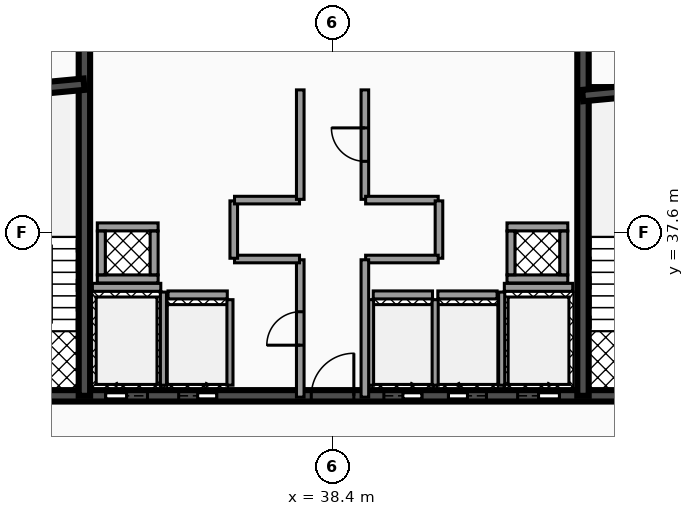
"""IFC4 building model, lengths in metres.
Left out: names, types, materials, properties, quantities, classifications, styles, units other than length and angle.
Written with IfcOpenShell. Run it as: python <this file> out.ifc"""

import sys

from ifc_helpers import new_model, si_unit, direction, frame, frame_2d, origin, place, context, subcontext, project, spatial, rectangle, extrude, element, fill, save


model = new_model("IFC4")
c1 = context("Model", 3, precision=1e-05, world=origin(), true_north=direction((0.0, 1.0)))
c2 = subcontext(c1, "Body", "Model", "MODEL_VIEW")
j1 = project(units=[si_unit("LENGTHUNIT", "METRE"), si_unit("PLANEANGLEUNIT", "RADIAN")], contexts=[c1])
p1 = place(None, origin())
s1 = spatial("IfcSite", under=j1, at=p1, CompositionType="ELEMENT")
p2 = place(p1, origin())
s2 = spatial("IfcBuilding", under=s1, at=p2, CompositionType="ELEMENT")
p3 = place(p2, frame((0.0, 0.0, 275.4)))
s3 = spatial("IfcBuildingStorey", under=s2, at=p3, CompositionType="ELEMENT", Elevation=275.4)
p4 = place(p3, frame((28.5, 33.3, 0.0), z_axis=(0.0, 0.0, 1.0), x_axis=(1.0, 0.0, 0.0)))
e1 = element("IfcWall", 1, at=p4, inside=s3, PredefinedType="SHEAR", context=c2, shape_type="SweptSolid", body=[
    extrude(rectangle(XDim=19.86, YDim=0.3, at=frame_2d((9.93, 0.0))), origin(), (0.0, 0.0, 1.0), 3.18),
])
p5 = place(p4, frame((3.93, 0.0, 0.0)))
e2 = element("IfcOpeningElement", 2, at=p5, cuts=e1, PredefinedType="OPENING", context=c2, shape_type="SweptSolid", body=[
    extrude(rectangle(XDim=1.1, YDim=2.15, at=frame_2d((0.55, 1.075))), frame((0.0, 0.16, 0.0), z_axis=(0.0, -1.0, 0.0), x_axis=(1.0, 0.0, 0.0)), (0.0, 0.0, 1.0), 0.32),
])
p6 = place(p4, frame((14.77, 0.0, 0.0)))
e3 = element("IfcOpeningElement", 3, at=p6, cuts=e1, PredefinedType="OPENING", context=c2, shape_type="SweptSolid", body=[
    extrude(rectangle(XDim=1.1, YDim=2.15, at=frame_2d((0.55, 1.075))), frame((0.0, 0.16, 0.0), z_axis=(0.0, -1.0, 0.0), x_axis=(1.0, 0.0, 0.0)), (0.0, 0.0, 1.0), 0.32),
])
p7 = place(p4, frame((11.25, 0.0, 0.0)))
e4 = element("IfcOpeningElement", 4, at=p7, cuts=e1, PredefinedType="OPENING", context=c2, shape_type="SweptSolid", body=[
    extrude(rectangle(XDim=1.0, YDim=2.1, at=frame_2d((0.5, 1.05))), frame((0.0, 0.16, 0.0), z_axis=(0.0, -1.0, 0.0), x_axis=(1.0, 0.0, 0.0)), (0.0, 0.0, 1.0), 0.32),
])
p8 = place(p4, frame((12.95, 0.0, 0.0)))
e5 = element("IfcOpeningElement", 5, at=p8, cuts=e1, PredefinedType="OPENING", context=c2, shape_type="SweptSolid", body=[
    extrude(rectangle(XDim=1.0, YDim=2.1, at=frame_2d((0.5, 1.05))), frame((0.0, 0.16, 0.0), z_axis=(0.0, -1.0, 0.0), x_axis=(1.0, 0.0, 0.0)), (0.0, 0.0, 1.0), 0.32),
])
p9 = place(p4, frame((5.85, 0.0, 0.0)))
e6 = element("IfcOpeningElement", 6, at=p9, cuts=e1, PredefinedType="OPENING", context=c2, shape_type="SweptSolid", body=[
    extrude(rectangle(XDim=1.0, YDim=2.1, at=frame_2d((0.5, 1.05))), frame((0.0, 0.16, 0.0), z_axis=(0.0, -1.0, 0.0), x_axis=(1.0, 0.0, 0.0)), (0.0, 0.0, 1.0), 0.32),
])
p10 = place(p4, frame((1.21, 0.0, 0.0)))
e7 = element("IfcOpeningElement", 7, at=p10, cuts=e1, PredefinedType="OPENING", context=c2, shape_type="SweptSolid", body=[
    extrude(rectangle(XDim=1.1, YDim=2.2, at=frame_2d((0.55, 1.1))), frame((0.0, 0.16, 0.0), z_axis=(0.0, -1.0, 0.0), x_axis=(1.0, 0.0, 0.0)), (0.0, 0.0, 1.0), 0.32),
])
p11 = place(p4, frame((9.34, 0.0, 0.0)))
e8 = element("IfcOpeningElement", 8, at=p11, cuts=e1, PredefinedType="OPENING", context=c2, shape_type="SweptSolid", body=[
    extrude(rectangle(XDim=1.12, YDim=2.05, at=frame_2d((0.56, 1.025))), frame((0.0, 0.16, 0.0), z_axis=(0.0, -1.0, 0.0), x_axis=(1.0, 0.0, 0.0)), (0.0, 0.0, 1.0), 0.32),
])
p12 = place(p4, frame((17.55, 0.0, 0.0)))
e9 = element("IfcOpeningElement", 9, at=p12, cuts=e1, PredefinedType="OPENING", context=c2, shape_type="SweptSolid", body=[
    extrude(rectangle(XDim=1.1, YDim=2.2, at=frame_2d((0.55, 1.1))), frame((0.0, 0.16, 0.0), z_axis=(0.0, -1.0, 0.0), x_axis=(1.0, 0.0, 0.0)), (0.0, 0.0, 1.0), 0.32),
])
for number, where, z_axis, x_axis in (
    (10, (31.87, 33.3, 0.0), (0.0, 0.0, 1.0), (0.0, 1.0, 0.0)),
    (11, (44.99, 33.3, 0.0), (0.0, 0.0, 1.0), (0.0, 1.0, 0.0)),
):
    element("IfcWall", number, at=place(p3, frame(where, z_axis=z_axis, x_axis=x_axis)), inside=s3, PredefinedType="SHEAR", context=c2, shape_type="SweptSolid", body=[
        extrude(rectangle(XDim=10.1, YDim=0.3, at=frame_2d((5.05, 0.0))), origin(), (0.0, 0.0, 1.0), 3.18),
    ])
p13 = place(p3, frame((28.64, 41.2, 0.0), z_axis=(0.0, 0.0, 1.0), x_axis=(0.995687118776, 0.092774789157, 0.0)))
e12 = element("IfcWall", 12, at=p13, inside=s3, PredefinedType="SHEAR", context=c2, shape_type="SweptSolid", body=[
    extrude(rectangle(XDim=3.234, YDim=0.3, at=frame_2d((1.617, 0.0))), origin(), (0.0, 0.0, 1.0), 3.18),
])
p14 = place(p3, frame((44.98, 41.2, 0.0), z_axis=(0.0, 0.0, 1.0), x_axis=(0.995686468965, 0.09278176286, 0.0)))
e13 = element("IfcWall", 13, at=p14, inside=s3, PredefinedType="SHEAR", context=c2, shape_type="SweptSolid", body=[
    extrude(rectangle(XDim=3.234, YDim=0.3, at=frame_2d((1.617, 0.0))), origin(), (0.0, 0.0, 1.0), 3.18),
])
p15 = place(p3, frame((32.08, 36.155, 0.0), z_axis=(0.0, 0.0, 1.0), x_axis=(1.0, 0.0, 0.0)))
e14 = element("IfcWall", 14, at=p15, inside=s3, PredefinedType="SOLIDWALL", context=c2, shape_type="SweptSolid", body=[
    extrude(rectangle(XDim=1.8, YDim=0.21, at=frame_2d((0.9, 0.0))), origin(), (0.0, 0.0, 1.0), 3.18),
])
p16 = place(p3, frame((33.95, 33.58, 0.0), z_axis=(0.0, 0.0, 1.0), x_axis=(0.0, 1.0, 0.0)))
e15 = element("IfcWall", 15, at=p16, inside=s3, PredefinedType="SOLIDWALL", context=c2, shape_type="SweptSolid", body=[
    extrude(rectangle(XDim=2.45, YDim=0.16, at=frame_2d((1.225, 0.0))), origin(), (0.0, 0.0, 1.0), 3.18),
])
p17 = place(p3, frame((42.92, 36.155, 0.0), z_axis=(0.0, 0.0, 1.0), x_axis=(1.0, 0.0, 0.0)))
e16 = element("IfcWall", 16, at=p17, inside=s3, PredefinedType="SOLIDWALL", context=c2, shape_type="SweptSolid", body=[
    extrude(rectangle(XDim=1.8, YDim=0.21, at=frame_2d((0.9, 0.0))), origin(), (0.0, 0.0, 1.0), 3.18),
])
p18 = place(p3, frame((42.85, 33.58, 0.0), z_axis=(0.0, 0.0, 1.0), x_axis=(0.0, 1.0, 0.0)))
e17 = element("IfcWall", 17, at=p18, inside=s3, PredefinedType="SOLIDWALL", context=c2, shape_type="SweptSolid", body=[
    extrude(rectangle(XDim=2.45, YDim=0.16, at=frame_2d((1.225, 0.0))), origin(), (0.0, 0.0, 1.0), 3.18),
])
p19 = place(p3, frame((39.47, 35.955, 0.0), z_axis=(0.0, 0.0, 1.0), x_axis=(1.0, 0.0, 0.0)))
e18 = element("IfcWall", 18, at=p19, inside=s3, PredefinedType="SOLIDWALL", context=c2, shape_type="SweptSolid", body=[
    extrude(rectangle(XDim=1.56, YDim=0.21, at=frame_2d((0.78, 0.0))), origin(), (0.0, 0.0, 1.0), 3.18),
])
for number, where, z_axis, x_axis in (
    (19, (39.4, 33.58, 0.0), (0.0, 0.0, 1.0), (0.0, 1.0, 0.0)),
    (20, (41.1, 33.58, 0.0), (0.0, 0.0, 1.0), (0.0, 1.0, 0.0)),
):
    element("IfcWall", number, at=place(p3, frame(where, z_axis=z_axis, x_axis=x_axis)), inside=s3, PredefinedType="SOLIDWALL", context=c2, shape_type="SweptSolid", body=[
        extrude(rectangle(XDim=2.25, YDim=0.16, at=frame_2d((1.125, 0.0))), origin(), (0.0, 0.0, 1.0), 3.18),
    ])
p20 = place(p3, frame((41.17, 35.955, 0.0), z_axis=(0.0, 0.0, 1.0), x_axis=(1.0, 0.0, 0.0)))
e21 = element("IfcWall", 21, at=p20, inside=s3, PredefinedType="SOLIDWALL", context=c2, shape_type="SweptSolid", body=[
    extrude(rectangle(XDim=1.56, YDim=0.21, at=frame_2d((0.78, 0.0))), origin(), (0.0, 0.0, 1.0), 3.18),
])
p21 = place(p3, frame((34.07, 35.955, 0.0), z_axis=(0.0, 0.0, 1.0), x_axis=(1.0, 0.0, 0.0)))
e22 = element("IfcWall", 22, at=p21, inside=s3, PredefinedType="SOLIDWALL", context=c2, shape_type="SweptSolid", body=[
    extrude(rectangle(XDim=1.56, YDim=0.21, at=frame_2d((0.78, 0.0))), origin(), (0.0, 0.0, 1.0), 3.18),
])
p22 = place(p3, frame((35.7, 33.58, 0.0), z_axis=(0.0, 0.0, 1.0), x_axis=(0.0, 1.0, 0.0)))
e23 = element("IfcWall", 23, at=p22, inside=s3, PredefinedType="SOLIDWALL", context=c2, shape_type="SweptSolid", body=[
    extrude(rectangle(XDim=2.25, YDim=0.16, at=frame_2d((1.125, 0.0))), origin(), (0.0, 0.0, 1.0), 3.18),
])
for number, where, z_axis, x_axis in (
    (24, (32.21, 36.375, 0.0), (0.0, 0.0, 1.0), (1.0, 0.0, 0.0)),
    (25, (32.21, 37.745, 0.0), (0.0, 0.0, 1.0), (1.0, 0.0, 0.0)),
):
    element("IfcWall", number, at=place(p3, frame(where, z_axis=z_axis, x_axis=x_axis)), inside=s3, PredefinedType="SOLIDWALL", context=c2, shape_type="SweptSolid", body=[
        extrude(rectangle(XDim=1.6, YDim=0.21, at=frame_2d((0.8, 0.0))), origin(), (0.0, 0.0, 1.0), 3.18),
    ])
for number, where, z_axis, x_axis in (
    (26, (32.315, 36.485, 0.0), (0.0, 0.0, 1.0), (0.0, 1.0, 0.0)),
    (27, (33.705, 36.485, 0.0), (0.0, 0.0, 1.0), (0.0, 1.0, 0.0)),
):
    element("IfcWall", number, at=place(p3, frame(where, z_axis=z_axis, x_axis=x_axis)), inside=s3, PredefinedType="SOLIDWALL", context=c2, shape_type="SweptSolid", body=[
        extrude(rectangle(XDim=1.15, YDim=0.21, at=frame_2d((0.575, 0.0))), origin(), (0.0, 0.0, 1.0), 3.18),
    ])
for number, where, z_axis, x_axis in (
    (28, (42.99, 36.375, 0.0), (0.0, 0.0, 1.0), (1.0, 0.0, 0.0)),
    (29, (42.99, 37.745, 0.0), (0.0, 0.0, 1.0), (1.0, 0.0, 0.0)),
):
    element("IfcWall", number, at=place(p3, frame(where, z_axis=z_axis, x_axis=x_axis)), inside=s3, PredefinedType="SOLIDWALL", context=c2, shape_type="SweptSolid", body=[
        extrude(rectangle(XDim=1.6, YDim=0.21, at=frame_2d((0.8, 0.0))), origin(), (0.0, 0.0, 1.0), 3.18),
    ])
for number, where, z_axis, x_axis in (
    (30, (43.095, 36.485, 0.0), (0.0, 0.0, 1.0), (0.0, 1.0, 0.0)),
    (31, (44.485, 36.485, 0.0), (0.0, 0.0, 1.0), (0.0, 1.0, 0.0)),
):
    element("IfcWall", number, at=place(p3, frame(where, z_axis=z_axis, x_axis=x_axis)), inside=s3, PredefinedType="SOLIDWALL", context=c2, shape_type="SweptSolid", body=[
        extrude(rectangle(XDim=1.15, YDim=0.21, at=frame_2d((0.575, 0.0))), origin(), (0.0, 0.0, 1.0), 3.18),
    ])
p23 = place(p3, frame((37.55, 33.265, 0.0), z_axis=(0.0, 0.0, 1.0), x_axis=(0.0, 1.0, 0.0)))
e32 = element("IfcWall", 32, at=p23, inside=s3, PredefinedType="PARTITIONING", context=c2, shape_type="SweptSolid", body=[
    extrude(rectangle(XDim=3.615, YDim=0.2, at=frame_2d((1.808, 0.0))), origin(), (0.0, 0.0, 1.0), 2.235),
])
p24 = place(p23, frame((1.367, 0.0, 0.0)))
e33 = element("IfcOpeningElement", 33, at=p24, cuts=e32, PredefinedType="OPENING", context=c2, shape_type="SweptSolid", body=[
    extrude(rectangle(XDim=0.88, YDim=2.05, at=frame_2d((0.44, 1.025))), frame((0.0, 0.11, 0.0), z_axis=(0.0, -1.0, 0.0), x_axis=(1.0, 0.0, 0.0)), (0.0, 0.0, 1.0), 0.22),
])
p25 = place(p3, frame((35.82, 36.9, 0.0), z_axis=(0.0, 0.0, 1.0), x_axis=(1.0, 0.0, 0.0)))
e34 = element("IfcWall", 34, at=p25, inside=s3, PredefinedType="PARTITIONING", context=c2, shape_type="SweptSolid", body=[
    extrude(rectangle(XDim=1.71, YDim=0.2, at=frame_2d((0.855, 0.0))), origin(), (0.0, 0.0, 1.0), 2.235),
])
p26 = place(p3, frame((35.8, 36.92, 0.0), z_axis=(0.0, 0.0, 1.0), x_axis=(0.0, 1.0, 0.0)))
e35 = element("IfcWall", 35, at=p26, inside=s3, PredefinedType="PARTITIONING", context=c2, shape_type="SweptSolid", body=[
    extrude(rectangle(XDim=1.51, YDim=0.2, at=frame_2d((0.755, 0.0))), origin(), (0.0, 0.0, 1.0), 2.235),
])
p27 = place(p3, frame((35.82, 38.45, 0.0), z_axis=(0.0, 0.0, 1.0), x_axis=(1.0, 0.0, 0.0)))
e36 = element("IfcWall", 36, at=p27, inside=s3, PredefinedType="PARTITIONING", context=c2, shape_type="SweptSolid", body=[
    extrude(rectangle(XDim=1.71, YDim=0.2, at=frame_2d((0.855, 0.0))), origin(), (0.0, 0.0, 1.0), 2.235),
])
p28 = place(p3, frame((37.55, 38.47, 0.0), z_axis=(0.0, 0.0, 1.0), x_axis=(0.0, 1.0, 0.0)))
e37 = element("IfcWall", 37, at=p28, inside=s3, PredefinedType="PARTITIONING", context=c2, shape_type="SweptSolid", body=[
    extrude(rectangle(XDim=2.88, YDim=0.2, at=frame_2d((1.44, 0.0))), origin(), (0.0, 0.0, 1.0), 2.235),
])
p29 = place(p3, frame((39.25, 38.47, 0.0), z_axis=(0.0, 0.0, 1.0), x_axis=(0.0, 1.0, 0.0)))
e38 = element("IfcWall", 38, at=p29, inside=s3, PredefinedType="PARTITIONING", context=c2, shape_type="SweptSolid", body=[
    extrude(rectangle(XDim=2.88, YDim=0.2, at=frame_2d((1.44, 0.0))), origin(), (0.0, 0.0, 1.0), 2.235),
])
p30 = place(p29, frame((1.0, 0.0, 0.0)))
e39 = element("IfcOpeningElement", 39, at=p30, cuts=e38, PredefinedType="OPENING", context=c2, shape_type="SweptSolid", body=[
    extrude(rectangle(XDim=0.88, YDim=2.05, at=frame_2d((0.44, 1.025))), frame((0.0, 0.11, 0.0), z_axis=(0.0, -1.0, 0.0), x_axis=(1.0, 0.0, 0.0)), (0.0, 0.0, 1.0), 0.22),
])
p31 = place(p3, frame((39.27, 38.45, 0.0), z_axis=(0.0, 0.0, 1.0), x_axis=(1.0, 0.0, 0.0)))
e40 = element("IfcWall", 40, at=p31, inside=s3, PredefinedType="PARTITIONING", context=c2, shape_type="SweptSolid", body=[
    extrude(rectangle(XDim=1.91, YDim=0.2, at=frame_2d((0.955, 0.0))), origin(), (0.0, 0.0, 1.0), 2.235),
])
p32 = place(p3, frame((41.2, 36.92, 0.0), z_axis=(0.0, 0.0, 1.0), x_axis=(0.0, 1.0, 0.0)))
e41 = element("IfcWall", 41, at=p32, inside=s3, PredefinedType="PARTITIONING", context=c2, shape_type="SweptSolid", body=[
    extrude(rectangle(XDim=1.51, YDim=0.2, at=frame_2d((0.755, 0.0))), origin(), (0.0, 0.0, 1.0), 2.235),
])
p33 = place(p3, frame((39.27, 36.9, 0.0), z_axis=(0.0, 0.0, 1.0), x_axis=(1.0, 0.0, 0.0)))
e42 = element("IfcWall", 42, at=p33, inside=s3, PredefinedType="PARTITIONING", context=c2, shape_type="SweptSolid", body=[
    extrude(rectangle(XDim=1.91, YDim=0.2, at=frame_2d((0.955, 0.0))), origin(), (0.0, 0.0, 1.0), 2.235),
])
p34 = place(p3, frame((39.25, 33.265, 0.0), z_axis=(0.0, 0.0, 1.0), x_axis=(0.0, 1.0, 0.0)))
e43 = element("IfcWall", 43, at=p34, inside=s3, PredefinedType="PARTITIONING", context=c2, shape_type="SweptSolid", body=[
    extrude(rectangle(XDim=3.615, YDim=0.2, at=frame_2d((1.808, 0.0))), origin(), (0.0, 0.0, 1.0), 2.235),
])
p35 = place(p5, origin())
e44 = element("IfcDoor", 44, at=p35, inside=s3, OperationType="SLIDING_TO_LEFT", PredefinedType="DOOR", context=c2, shape_type="SweptSolid", body=[
    extrude(rectangle(XDim=1.1, YDim=2.15, at=frame_2d((0.55, 1.075))), frame((0.0, 0.025, 0.0), z_axis=(0.0, -1.0, 0.0), x_axis=(1.0, 0.0, 0.0)), (0.0, 0.0, 1.0), 0.05),
])
fill(e2, e44)
p36 = place(p6, origin())
e45 = element("IfcDoor", 45, at=p36, inside=s3, OperationType="SLIDING_TO_RIGHT", PredefinedType="DOOR", context=c2, shape_type="SweptSolid", body=[
    extrude(rectangle(XDim=1.1, YDim=2.15, at=frame_2d((0.55, 1.075))), frame((0.0, 0.025, 0.0), z_axis=(0.0, -1.0, 0.0), x_axis=(1.0, 0.0, 0.0)), (0.0, 0.0, 1.0), 0.05),
])
fill(e3, e45)
p37 = place(p7, origin())
e46 = element("IfcDoor", 46, at=p37, inside=s3, OperationType="SLIDING_TO_RIGHT", PredefinedType="DOOR", context=c2, shape_type="SweptSolid", body=[
    extrude(rectangle(XDim=1.0, YDim=2.1, at=frame_2d((0.5, 1.05))), frame((0.0, 0.025, 0.0), z_axis=(0.0, -1.0, 0.0), x_axis=(1.0, 0.0, 0.0)), (0.0, 0.0, 1.0), 0.05),
])
fill(e4, e46)
p38 = place(p8, origin())
e47 = element("IfcDoor", 47, at=p38, inside=s3, OperationType="SLIDING_TO_LEFT", PredefinedType="DOOR", context=c2, shape_type="SweptSolid", body=[
    extrude(rectangle(XDim=1.0, YDim=2.1, at=frame_2d((0.5, 1.05))), frame((0.0, 0.025, 0.0), z_axis=(0.0, -1.0, 0.0), x_axis=(1.0, 0.0, 0.0)), (0.0, 0.0, 1.0), 0.05),
])
fill(e5, e47)
p39 = place(p9, origin())
e48 = element("IfcDoor", 48, at=p39, inside=s3, OperationType="SLIDING_TO_RIGHT", PredefinedType="DOOR", context=c2, shape_type="SweptSolid", body=[
    extrude(rectangle(XDim=1.0, YDim=2.1, at=frame_2d((0.5, 1.05))), frame((0.0, 0.025, 0.0), z_axis=(0.0, -1.0, 0.0), x_axis=(1.0, 0.0, 0.0)), (0.0, 0.0, 1.0), 0.05),
])
fill(e6, e48)
p40 = place(p11, origin())
e49 = element("IfcDoor", 49, at=p40, inside=s3, OperationType="SINGLE_SWING_RIGHT", PredefinedType="DOOR", context=c2, shape_type="SweptSolid", body=[
    extrude(rectangle(XDim=1.12, YDim=2.05, at=frame_2d((0.56, 1.025))), frame((0.0, 0.025, 0.0), z_axis=(0.0, -1.0, 0.0), x_axis=(1.0, 0.0, 0.0)), (0.0, 0.0, 1.0), 0.05),
])
fill(e8, e49)
p41 = place(p24, origin())
e50 = element("IfcDoor", 50, at=p41, inside=s3, OperationType="SINGLE_SWING_LEFT", PredefinedType="DOOR", context=c2, shape_type="SweptSolid", body=[
    extrude(rectangle(XDim=0.88, YDim=2.05, at=frame_2d((0.44, 1.025))), frame((0.0, 0.025, 0.0), z_axis=(0.0, -1.0, 0.0), x_axis=(1.0, 0.0, 0.0)), (0.0, 0.0, 1.0), 0.05),
])
fill(e33, e50)
p42 = place(p30, origin())
e51 = element("IfcDoor", 51, at=p42, inside=s3, OperationType="SINGLE_SWING_RIGHT", PredefinedType="DOOR", context=c2, shape_type="SweptSolid", body=[
    extrude(rectangle(XDim=0.88, YDim=2.05, at=frame_2d((0.44, 1.025))), frame((0.0, 0.025, 0.0), z_axis=(0.0, -1.0, 0.0), x_axis=(1.0, 0.0, 0.0)), (0.0, 0.0, 1.0), 0.05),
])
fill(e39, e51)
save(model, sys.argv[1])
